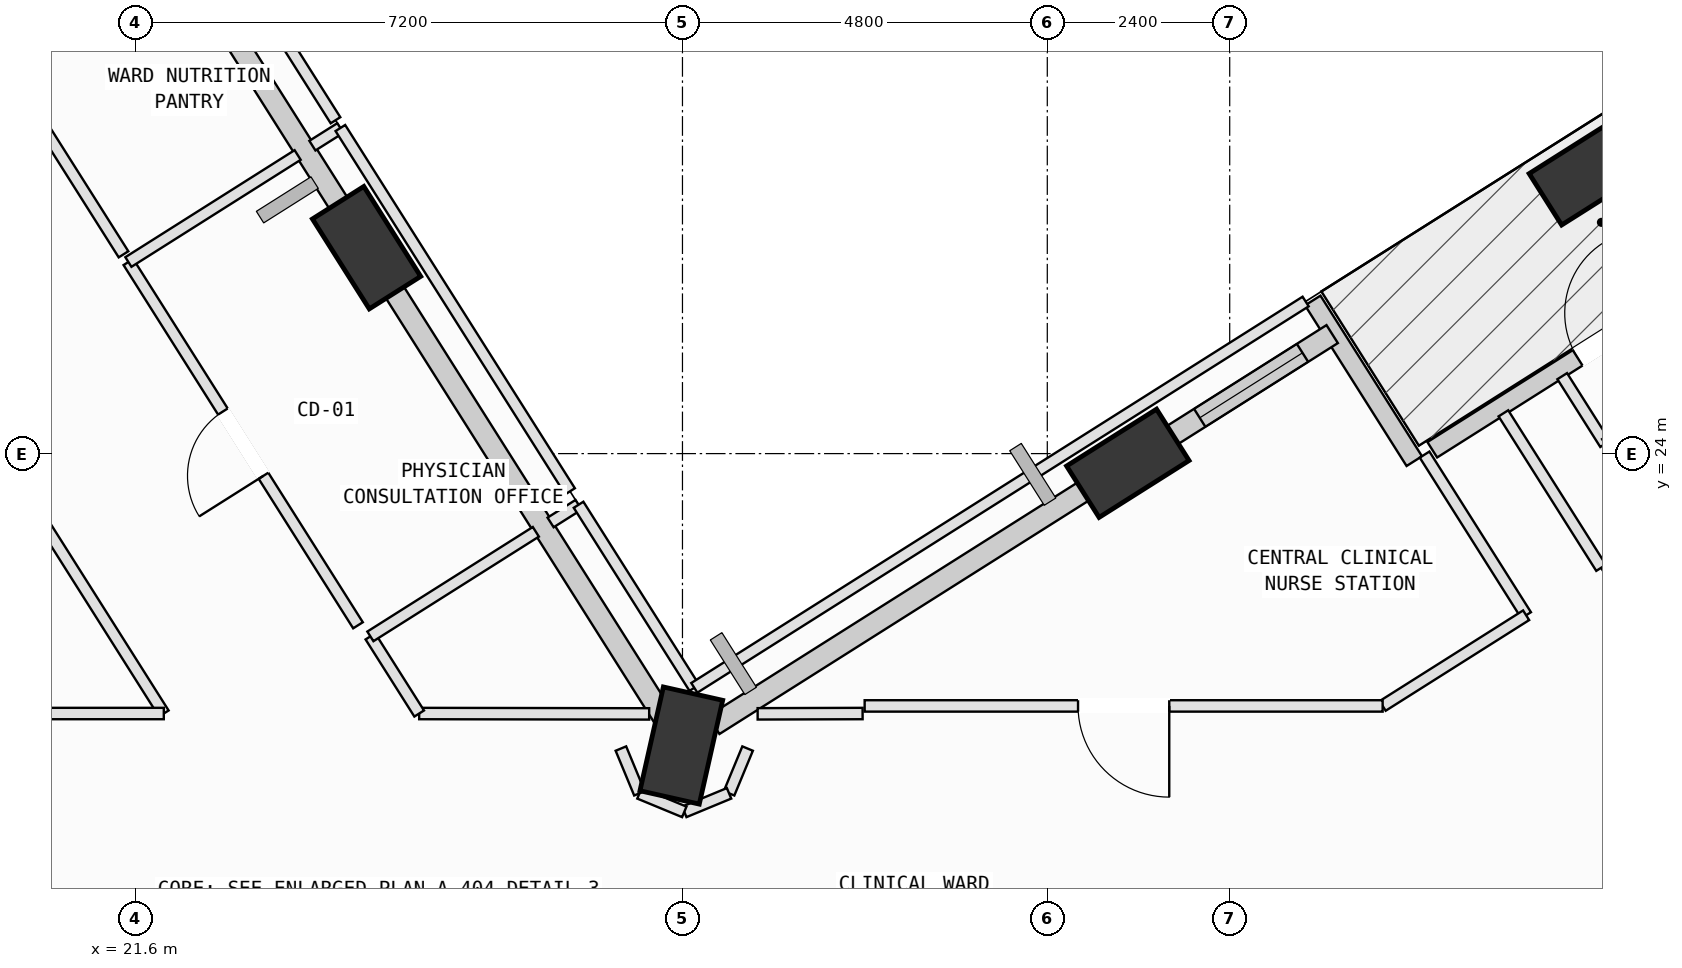
"""IFC4 building model, lengths in metres.
Left out: names, types, materials, properties, quantities, classifications, styles, units other than length and angle.
Written with IfcOpenShell. Run it as: python <this file> out.ifc"""

import sys

from ifc_helpers import new_model, si_unit, direction, frame, frame_2d, origin, origin_2d, place, context, subcontext, project, spatial, rectangle, extrude, element, fill, save


model = new_model("IFC4")
c1 = context("Model", 3, precision=1e-05, world=origin(), true_north=direction((0.0, 1.0)))
c2 = subcontext(c1, "Body", "Model", "MODEL_VIEW")
j1 = project(units=[si_unit("LENGTHUNIT", "METRE"), si_unit("PLANEANGLEUNIT", "RADIAN")], contexts=[c1])
p1 = place(None, origin())
s1 = spatial("IfcSite", under=j1, at=p1, CompositionType="ELEMENT")
p2 = place(p1, origin())
s2 = spatial("IfcBuilding", under=s1, at=p2, CompositionType="ELEMENT")
p3 = place(p2, frame((0.0, 0.0, 161.8)))
s3 = spatial("IfcBuildingStorey", under=s2, at=p3, CompositionType="ELEMENT", Elevation=161.8)
p4 = place(p3, frame((40.745, 27.72, 0.002), z_axis=(-0.012334092579, 0.029491914435, 0.999488917969), x_axis=(-0.573744273025, -0.818856350505, 0.017081756622)))
e1 = element("IfcColumn", 1, at=p4, inside=s3, PredefinedType="COLUMN", context=c2, shape_type="SweptSolid", body=[
    extrude(rectangle(XDim=1.4, YDim=0.8, at=origin_2d()), origin(), (0.0, 0.0, 1.0), 3.998),
])
p5 = place(p3, frame((34.659, 23.873, 0.002), z_axis=(0.003848671693, 0.004459571961, 0.999982649822), x_axis=(-0.989023621545, 0.147723958903, 0.003147696204)))
e2 = element("IfcColumn", 2, at=p5, inside=s3, PredefinedType="COLUMN", context=c2, shape_type="SweptSolid", body=[
    extrude(rectangle(XDim=1.4, YDim=0.8, at=origin_2d()), origin(), (0.0, 0.0, 1.0), 3.996),
])
p6 = place(p3, frame((28.785, 20.159, 0.002), z_axis=(0.019419498398, -0.019785904028, 0.99961562667), x_axis=(-0.526167062384, 0.849951040791, 0.027045345657)))
e3 = element("IfcColumn", 3, at=p6, inside=s3, PredefinedType="COLUMN", context=c2, shape_type="SweptSolid", body=[
    extrude(rectangle(XDim=1.4, YDim=0.8, at=origin_2d()), origin(), (0.0, 0.0, 1.0), 3.998),
])
p7 = place(p3, frame((24.644, 26.71, 0.002), z_axis=(-0.007569840548, -0.037177684627, 0.99927999944), x_axis=(-0.355084598959, 0.934283931075, 0.032069669727)))
e4 = element("IfcColumn", 4, at=p7, inside=s3, PredefinedType="COLUMN", context=c2, shape_type="SweptSolid", body=[
    extrude(rectangle(XDim=1.4, YDim=0.8, at=origin_2d()), origin(), (0.0, 0.0, 1.0), 3.999),
])
p8 = place(p3, frame((38.665, 24.051, 0.0), z_axis=(0.0, 0.0, 1.0), x_axis=(0.84524375299, 0.534380948417, 0.0)))
e5 = element("IfcWall", 5, at=p8, inside=s3, PredefinedType="SOLIDWALL", context=c2, shape_type="SweptSolid", body=[
    extrude(rectangle(XDim=6.96, YDim=0.24, at=frame_2d((3.48, 0.0))), origin(), (0.0, 0.0, 1.0), 3.045),
])
p9 = place(p8, frame((2.263, 0.0, 0.0)))
e6 = element("IfcOpeningElement", 6, at=p9, cuts=e5, PredefinedType="OPENING", context=c2, shape_type="SweptSolid", body=[
    extrude(rectangle(XDim=1.1, YDim=2.15, at=frame_2d((0.55, 1.075))), frame((0.0, 0.13, 0.0), z_axis=(0.0, -1.0, 0.0), x_axis=(1.0, 0.0, 0.0)), (0.0, 0.0, 1.0), 0.26),
])
p10 = place(p3, frame((37.093, 26.014, 0.0), z_axis=(0.0, 0.0, 1.0), x_axis=(0.534345648323, -0.845266069423, 0.0)))
e7 = element("IfcWall", 7, at=p10, inside=s3, PredefinedType="SOLIDWALL", context=c2, shape_type="SweptSolid", body=[
    extrude(rectangle(XDim=2.5, YDim=0.24, at=frame_2d((1.25, 0.0))), origin(), (0.0, 0.0, 1.0), 3.165),
])
p11 = place(p3, frame((35.088, 24.144, 0.0), z_axis=(0.0, 0.0, 1.0), x_axis=(0.845263172576, 0.534350230735, 0.0)))
e8 = element("IfcWall", 8, at=p11, inside=s3, PredefinedType="SOLIDWALL", context=c2, shape_type="SweptSolid", body=[
    extrude(rectangle(XDim=2.674, YDim=0.28, at=frame_2d((1.337, 0.0))), origin(), (0.0, 0.0, 1.0), 3.145),
])
p12 = place(p11, frame((0.612, 0.0, 0.75)))
e9 = element("IfcOpeningElement", 9, at=p12, cuts=e8, PredefinedType="OPENING", context=c2, shape_type="SweptSolid", body=[
    extrude(rectangle(XDim=1.6, YDim=1.95, at=frame_2d((0.8, 0.975))), frame((0.0, 0.15, 0.0), z_axis=(0.0, -1.0, 0.0), x_axis=(1.0, 0.0, 0.0)), (0.0, 0.0, 1.0), 0.3),
])
p13 = place(p3, frame((29.212, 20.429, 0.0), z_axis=(0.0, 0.0, 1.0), x_axis=(0.845278586038, 0.534325848136, 0.0)))
e10 = element("IfcWall", 10, at=p13, inside=s3, PredefinedType="SOLIDWALL", context=c2, shape_type="SweptSolid", body=[
    extrude(rectangle(XDim=5.96, YDim=0.28, at=frame_2d((2.98, 0.0))), origin(), (0.0, 0.0, 1.0), 3.165),
])
p14 = place(p3, frame((28.549, 20.532, 0.0), z_axis=(0.0, 0.0, 1.0), x_axis=(-0.534367970057, 0.845251958044, 0.0)))
e11 = element("IfcWall", 11, at=p14, inside=s3, PredefinedType="SOLIDWALL", context=c2, shape_type="SweptSolid", body=[
    extrude(rectangle(XDim=6.76, YDim=0.28, at=frame_2d((3.38, 0.0))), origin(), (0.0, 0.0, 1.0), 3.165),
])
p15 = place(p3, frame((24.409, 27.081, 0.0), z_axis=(0.0, 0.0, 1.0), x_axis=(-0.534364923139, 0.845253884296, 0.0)))
e12 = element("IfcWall", 12, at=p15, inside=s3, PredefinedType="SOLIDWALL", context=c2, shape_type="SweptSolid", body=[
    extrude(rectangle(XDim=6.223, YDim=0.28, at=frame_2d((3.111, 0.0))), origin(), (0.0, 0.0, 1.0), 3.165),
])
p16 = place(p15, frame((2.911, 0.0, 0.75)))
e13 = element("IfcOpeningElement", 13, at=p16, cuts=e12, PredefinedType="OPENING", context=c2, shape_type="SweptSolid", body=[
    extrude(rectangle(XDim=1.8, YDim=2.05, at=frame_2d((0.9, 1.025))), frame((0.0, 0.15, 0.0), z_axis=(0.0, -1.0, 0.0), x_axis=(1.0, 0.0, 0.0)), (0.0, 0.0, 1.0), 0.3),
])
p17 = place(p3, frame((31.17, 20.58, 0.0), z_axis=(0.0, 0.0, 1.0), x_axis=(-0.999995483041, -0.003005644132, 0.0)))
e14 = element("IfcWall", 14, at=p17, inside=s3, PredefinedType="PARTITIONING", context=c2, shape_type="SweptSolid", body=[
    extrude(rectangle(XDim=1.381, YDim=0.15, at=frame_2d((0.69, 0.0))), origin(), (0.0, 0.0, 1.0), 3.78),
])
p18 = place(p3, frame((29.657, 20.119, 0.0), z_axis=(0.0, 0.0, 1.0), x_axis=(-0.382656259044, -0.923890787601, 0.0)))
e15 = element("IfcWall", 15, at=p18, inside=s3, PredefinedType="PARTITIONING", context=c2, shape_type="SweptSolid", body=[
    extrude(rectangle(XDim=0.637, YDim=0.15, at=frame_2d((0.319, 0.0))), origin(), (0.0, 0.0, 1.0), 3.78),
])
p19 = place(p3, frame((29.413, 19.53, 0.0), z_axis=(0.0, 0.0, 1.0), x_axis=(-0.923811477415, -0.382847690599, 0.0)))
e16 = element("IfcWall", 16, at=p19, inside=s3, PredefinedType="PARTITIONING", context=c2, shape_type="SweptSolid", body=[
    extrude(rectangle(XDim=0.638, YDim=0.15, at=frame_2d((0.319, 0.0))), origin(), (0.0, 0.0, 1.0), 3.415),
])
p20 = place(p3, frame((28.824, 19.286, 0.0), z_axis=(0.0, 0.0, 1.0), x_axis=(-0.924035461503, 0.382306769343, 0.0)))
e17 = element("IfcWall", 17, at=p20, inside=s3, PredefinedType="PARTITIONING", context=c2, shape_type="SweptSolid", body=[
    extrude(rectangle(XDim=0.639, YDim=0.15, at=frame_2d((0.319, 0.0))), origin(), (0.0, 0.0, 1.0), 3.78),
])
p21 = place(p3, frame((28.234, 19.53, 0.0), z_axis=(0.0, 0.0, 1.0), x_axis=(-0.382656259044, 0.923890787601, 0.0)))
e18 = element("IfcWall", 18, at=p21, inside=s3, PredefinedType="PARTITIONING", context=c2, shape_type="SweptSolid", body=[
    extrude(rectangle(XDim=0.637, YDim=0.15, at=frame_2d((0.319, 0.0))), origin(), (0.0, 0.0, 1.0), 3.78),
])
p22 = place(p3, frame((28.362, 20.575, 0.0), z_axis=(0.0, 0.0, 1.0), x_axis=(-0.999998564793, 0.001694229113, 0.0)))
e19 = element("IfcWall", 19, at=p22, inside=s3, PredefinedType="PARTITIONING", context=c2, shape_type="SweptSolid", body=[
    extrude(rectangle(XDim=3.026, YDim=0.15, at=frame_2d((1.513, 0.0))), origin(), (0.0, 0.0, 1.0), 3.78),
])
p23 = place(p3, frame((25.336, 20.58, 0.0), z_axis=(0.0, 0.0, 1.0), x_axis=(-0.53450539879, 0.845165060012, 0.0)))
e20 = element("IfcWall", 20, at=p23, inside=s3, PredefinedType="PARTITIONING", context=c2, shape_type="SweptSolid", body=[
    extrude(rectangle(XDim=1.201, YDim=0.15, at=frame_2d((0.601, 0.0))), origin(), (0.0, 0.0, 1.0), 3.415),
])
p24 = place(p3, frame((24.694, 21.595, 0.0), z_axis=(0.0, 0.0, 1.0), x_axis=(0.845308645917, 0.534278291846, 0.0)))
e21 = element("IfcWall", 21, at=p24, inside=s3, PredefinedType="PARTITIONING", context=c2, shape_type="SweptSolid", body=[
    extrude(rectangle(XDim=2.575, YDim=0.15, at=frame_2d((1.288, 0.0))), origin(), (0.0, 0.0, 1.0), 3.78),
])
p25 = place(p3, frame((27.065, 23.094, 0.0), z_axis=(0.0, 0.0, 1.0), x_axis=(0.84508917053, 0.534625377113, 0.0)))
e22 = element("IfcWall", 22, at=p25, inside=s3, PredefinedType="PARTITIONING", context=c2, shape_type="SweptSolid", body=[
    extrude(rectangle(XDim=0.436, YDim=0.15, at=frame_2d((0.218, 0.0))), origin(), (0.0, 0.0, 1.0), 3.78),
])
p26 = place(p3, frame((27.433, 23.327, 0.0), z_axis=(0.0, 0.0, 1.0), x_axis=(0.534373252467, -0.845248618483, 0.0)))
e23 = element("IfcWall", 23, at=p26, inside=s3, PredefinedType="PARTITIONING", context=c2, shape_type="SweptSolid", body=[
    extrude(rectangle(XDim=2.85, YDim=0.15, at=frame_2d((1.425, 0.0))), origin(), (0.0, 0.0, 1.0), 3.78),
])
p27 = place(p3, frame((28.956, 20.918, 0.0), z_axis=(0.0, 0.0, 1.0), x_axis=(0.845335214323, 0.534236254316, 0.0)))
e24 = element("IfcWall", 24, at=p27, inside=s3, PredefinedType="PARTITIONING", context=c2, shape_type="SweptSolid", body=[
    extrude(rectangle(XDim=9.515, YDim=0.15, at=frame_2d((4.757, 0.0))), origin(), (0.0, 0.0, 1.0), 3.78),
])
p28 = place(p3, frame((38.564, 23.987, 0.0), z_axis=(0.0, 0.0, 1.0), x_axis=(0.534213358296, -0.845349683751, 0.0)))
e25 = element("IfcWall", 25, at=p28, inside=s3, PredefinedType="PARTITIONING", context=c2, shape_type="SweptSolid", body=[
    extrude(rectangle(XDim=2.501, YDim=0.15, at=frame_2d((1.25, 0.0))), origin(), (0.0, 0.0, 1.0), 3.78),
])
p29 = place(p3, frame((39.9, 21.873, 0.0), z_axis=(0.0, 0.0, 1.0), x_axis=(-0.845340806847, -0.534227405025, 0.0)))
e26 = element("IfcWall", 26, at=p29, inside=s3, PredefinedType="PARTITIONING", context=c2, shape_type="SweptSolid", body=[
    extrude(rectangle(XDim=2.233, YDim=0.15, at=frame_2d((1.117, 0.0))), origin(), (0.0, 0.0, 1.0), 3.045),
])
p30 = place(p3, frame((38.012, 20.68, 0.0), z_axis=(0.0, 0.0, 1.0), x_axis=(-1.0, 0.0, 0.0)))
e27 = element("IfcWall", 27, at=p30, inside=s3, PredefinedType="PARTITIONING", context=c2, shape_type="SweptSolid", body=[
    extrude(rectangle(XDim=6.815, YDim=0.15, at=frame_2d((3.407, 0.0))), origin(), (0.0, 0.0, 1.0), 3.415),
])
p31 = place(p30, frame((2.808, 0.0, 0.0)))
e28 = element("IfcOpeningElement", 28, at=p31, cuts=e27, PredefinedType="OPENING", context=c2, shape_type="SweptSolid", body=[
    extrude(rectangle(XDim=1.2, YDim=2.15, at=frame_2d((0.6, 1.075))), frame((0.0, 0.085, 0.0), z_axis=(0.0, -1.0, 0.0), x_axis=(1.0, 0.0, 0.0)), (0.0, 0.0, 1.0), 0.17),
])
p32 = place(p3, frame((50.039, 28.283, 0.0), z_axis=(0.0, 0.0, 1.0), x_axis=(-0.845280431179, -0.534322929197, 0.0)))
e29 = element("IfcWall", 29, at=p32, inside=s3, PredefinedType="PARTITIONING", context=c2, shape_type="SweptSolid", body=[
    extrude(rectangle(XDim=10.828, YDim=0.15, at=frame_2d((5.414, 0.0))), origin(), (0.0, 0.0, 1.0), 3.78),
])
p33 = place(p32, frame((4.814, 0.0, 0.0)))
e30 = element("IfcOpeningElement", 30, at=p33, cuts=e29, PredefinedType="OPENING", context=c2, shape_type="SweptSolid", body=[
    extrude(rectangle(XDim=1.2, YDim=2.15, at=frame_2d((0.6, 1.075))), frame((0.0, 0.085, 0.0), z_axis=(0.0, -1.0, 0.0), x_axis=(1.0, 0.0, 0.0)), (0.0, 0.0, 1.0), 0.17),
])
p34 = place(p3, frame((40.886, 22.497, 0.0), z_axis=(0.0, 0.0, 1.0), x_axis=(-0.534271775948, 0.845312764263, 0.0)))
e31 = element("IfcWall", 31, at=p34, inside=s3, PredefinedType="PARTITIONING", context=c2, shape_type="SweptSolid", body=[
    extrude(rectangle(XDim=2.405, YDim=0.15, at=frame_2d((1.203, 0.0))), origin(), (0.0, 0.0, 1.0), 3.78),
])
p35 = place(p3, frame((40.375, 25.019, 0.0), z_axis=(0.0, 0.0, 1.0), x_axis=(0.534358479235, -0.845257958063, 0.0)))
e32 = element("IfcWall", 32, at=p35, inside=s3, PredefinedType="PARTITIONING", context=c2, shape_type="SweptSolid", body=[
    extrude(rectangle(XDim=1.055, YDim=0.15, at=frame_2d((0.528, 0.0))), origin(), (0.0, 0.0, 1.0), 3.78),
])
p36 = place(p3, frame((40.939, 24.127, 0.0), z_axis=(0.0, 0.0, 1.0), x_axis=(0.845130465674, 0.53456009577, 0.0)))
e33 = element("IfcWall", 33, at=p36, inside=s3, PredefinedType="PARTITIONING", context=c2, shape_type="SweptSolid", body=[
    extrude(rectangle(XDim=1.7, YDim=0.15, at=frame_2d((0.85, 0.0))), origin(), (0.0, 0.0, 1.0), 3.045),
])
p37 = place(p3, frame((24.531, 21.741, 0.0), z_axis=(0.0, 0.0, 1.0), x_axis=(-0.534249623968, 0.845326764802, 0.0)))
e34 = element("IfcWall", 34, at=p37, inside=s3, PredefinedType="PARTITIONING", context=c2, shape_type="SweptSolid", body=[
    extrude(rectangle(XDim=5.655, YDim=0.15, at=frame_2d((2.827, 0.0))), origin(), (0.0, 0.0, 1.0), 3.78),
])
p38 = place(p37, frame((2.327, 0.0, 0.0)))
e35 = element("IfcOpeningElement", 35, at=p38, cuts=e34, PredefinedType="OPENING", context=c2, shape_type="SweptSolid", body=[
    extrude(rectangle(XDim=1.0, YDim=2.12, at=frame_2d((0.5, 1.06))), frame((0.0, 0.085, 0.0), z_axis=(0.0, -1.0, 0.0), x_axis=(1.0, 0.0, 0.0)), (0.0, 0.0, 1.0), 0.17),
])
p39 = place(p3, frame((21.51, 26.521, 0.0), z_axis=(0.0, 0.0, 1.0), x_axis=(0.845248817842, 0.53437293713, 0.0)))
e36 = element("IfcWall", 36, at=p39, inside=s3, PredefinedType="PARTITIONING", context=c2, shape_type="SweptSolid", body=[
    extrude(rectangle(XDim=2.635, YDim=0.15, at=frame_2d((1.317, 0.0))), origin(), (0.0, 0.0, 1.0), 3.78),
])
p40 = place(p3, frame((23.931, 28.052, 0.0), z_axis=(0.0, 0.0, 1.0), x_axis=(0.846101639655, 0.533021589969, 0.0)))
e37 = element("IfcWall", 37, at=p40, inside=s3, PredefinedType="PARTITIONING", context=c2, shape_type="SweptSolid", body=[
    extrude(rectangle(XDim=0.435, YDim=0.15, at=frame_2d((0.218, 0.0))), origin(), (0.0, 0.0, 1.0), 3.78),
])
p41 = place(p3, frame((24.299, 28.284, 0.0), z_axis=(0.0, 0.0, 1.0), x_axis=(0.534373014898, -0.845248768677, 0.0)))
e38 = element("IfcWall", 38, at=p41, inside=s3, PredefinedType="PARTITIONING", context=c2, shape_type="SweptSolid", body=[
    extrude(rectangle(XDim=5.655, YDim=0.15, at=frame_2d((2.828, 0.0))), origin(), (0.0, 0.0, 1.0), 3.78),
])
p42 = place(p3, frame((21.446, 26.622, 0.0), z_axis=(0.0, 0.0, 1.0), x_axis=(-0.534429314986, 0.845213172687, 0.0)))
e39 = element("IfcWall", 39, at=p42, inside=s3, PredefinedType="PARTITIONING", context=c2, shape_type="SweptSolid", body=[
    extrude(rectangle(XDim=5.831, YDim=0.15, at=frame_2d((2.915, 0.0))), origin(), (0.0, 0.0, 1.0), 3.78),
])
p43 = place(p42, frame((2.455, 0.0, 0.0)))
e40 = element("IfcOpeningElement", 40, at=p43, cuts=e39, PredefinedType="OPENING", context=c2, shape_type="SweptSolid", body=[
    extrude(rectangle(XDim=0.92, YDim=2.1, at=frame_2d((0.46, 1.05))), frame((0.0, 0.085, 0.0), z_axis=(0.0, -1.0, 0.0), x_axis=(1.0, 0.0, 0.0)), (0.0, 0.0, 1.0), 0.17),
])
p44 = place(p3, frame((21.12, 33.313, 0.0), z_axis=(0.0, 0.0, 1.0), x_axis=(0.53438530718, -0.845240997272, 0.0)))
e41 = element("IfcWall", 41, at=p44, inside=s3, PredefinedType="PARTITIONING", context=c2, shape_type="SweptSolid", body=[
    extrude(rectangle(XDim=5.829, YDim=0.15, at=frame_2d((2.915, 0.0))), origin(), (0.0, 0.0, 1.0), 3.78),
])
p45 = place(p3, frame((20.057, 23.615, 0.0), z_axis=(0.0, 0.0, 1.0), x_axis=(0.534471261003, -0.845186648712, 0.0)))
e42 = element("IfcWall", 42, at=p45, inside=s3, PredefinedType="PARTITIONING", context=c2, shape_type="SweptSolid", body=[
    extrude(rectangle(XDim=3.591, YDim=0.15, at=frame_2d((1.795, 0.0))), origin(), (0.0, 0.0, 1.0), 3.78),
])
p46 = place(p3, frame((21.976, 20.58, 0.0), z_axis=(0.0, 0.0, 1.0), x_axis=(-1.0, 0.0, 0.0)))
e43 = element("IfcWall", 43, at=p46, inside=s3, PredefinedType="PARTITIONING", context=c2, shape_type="SweptSolid", body=[
    extrude(rectangle(XDim=5.844, YDim=0.15, at=frame_2d((2.922, 0.0))), origin(), (0.0, 0.0, 1.0), 3.78),
])
p47 = place(p46, frame((2.322, 0.0, 0.0)))
e44 = element("IfcOpeningElement", 44, at=p47, cuts=e43, PredefinedType="OPENING", context=c2, shape_type="SweptSolid", body=[
    extrude(rectangle(XDim=1.2, YDim=2.15, at=frame_2d((0.6, 1.075))), frame((0.0, 0.085, 0.0), z_axis=(0.0, -1.0, 0.0), x_axis=(1.0, 0.0, 0.0)), (0.0, 0.0, 1.0), 0.17),
])
p48 = place(p9, origin())
e45 = element("IfcDoor", 45, at=p48, inside=s3, OperationType="SINGLE_SWING_RIGHT", PredefinedType="DOOR", context=c2, shape_type="SweptSolid", body=[
    extrude(rectangle(XDim=1.1, YDim=2.15, at=frame_2d((0.55, 1.075))), frame((0.0, 0.025, 0.0), z_axis=(0.0, -1.0, 0.0), x_axis=(1.0, 0.0, 0.0)), (0.0, 0.0, 1.0), 0.05),
])
fill(e6, e45)
p49 = place(p12, origin())
e46 = element("IfcWindow", 46, at=p49, inside=s3, PartitioningType="SINGLE_PANEL", PredefinedType="WINDOW", context=c2, shape_type="SweptSolid", body=[
    extrude(rectangle(XDim=1.6, YDim=1.95, at=frame_2d((0.8, 0.975))), frame((0.0, 0.03, 0.0), z_axis=(0.0, -1.0, 0.0), x_axis=(1.0, 0.0, 0.0)), (0.0, 0.0, 1.0), 0.06),
])
fill(e9, e46)
p50 = place(p31, origin())
e47 = element("IfcDoor", 47, at=p50, inside=s3, OperationType="SINGLE_SWING_LEFT", PredefinedType="DOOR", context=c2, shape_type="SweptSolid", body=[
    extrude(rectangle(XDim=1.2, YDim=2.15, at=frame_2d((0.6, 1.075))), frame((0.0, 0.025, 0.0), z_axis=(0.0, -1.0, 0.0), x_axis=(1.0, 0.0, 0.0)), (0.0, 0.0, 1.0), 0.05),
])
fill(e28, e47)
p51 = place(p38, origin())
e48 = element("IfcDoor", 48, at=p51, inside=s3, OperationType="SINGLE_SWING_LEFT", PredefinedType="DOOR", context=c2, shape_type="SweptSolid", body=[
    extrude(rectangle(XDim=1.0, YDim=2.12, at=frame_2d((0.5, 1.06))), frame((0.0, 0.025, 0.0), z_axis=(0.0, -1.0, 0.0), x_axis=(1.0, 0.0, 0.0)), (0.0, 0.0, 1.0), 0.05),
])
fill(e35, e48)
save(model, sys.argv[1])
